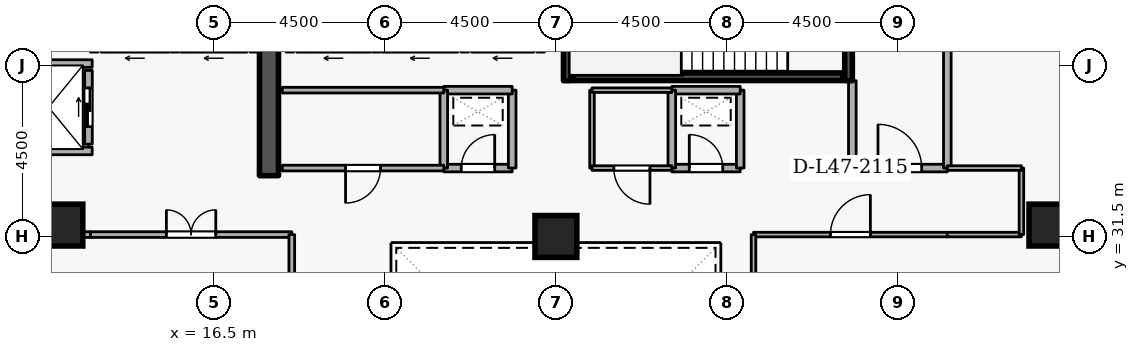
"""IFC4 building model, lengths in metres.
Left out: names, types, materials, properties, quantities, classifications, styles, units other than length and angle.
Written with IfcOpenShell. Run it as: python <this file> out.ifc"""

import sys

from ifc_helpers import new_model, si_unit, direction, frame, frame_2d, origin, origin_2d, place, context, subcontext, project, spatial, rectangle, extrude, element, fill, save


model = new_model("IFC4")
c1 = context("Model", 3, precision=1e-05, world=origin(), true_north=direction((0.0, 1.0)))
c2 = subcontext(c1, "Body", "Model", "MODEL_VIEW")
j1 = project(units=[si_unit("LENGTHUNIT", "METRE"), si_unit("PLANEANGLEUNIT", "RADIAN")], contexts=[c1])
p1 = place(None, origin())
s1 = spatial("IfcSite", under=j1, at=p1, CompositionType="ELEMENT")
p2 = place(p1, origin())
s2 = spatial("IfcBuilding", under=s1, at=p2, CompositionType="ELEMENT")
p3 = place(p2, frame((0.0, 0.0, 178.5)))
s3 = spatial("IfcBuildingStorey", under=s2, at=p3, CompositionType="ELEMENT", Elevation=178.5)
p4 = place(p3, frame((17.95, 33.1, 0.0), z_axis=(0.0, 0.0, 1.0), x_axis=(0.0, 1.0, 0.0)))
e1 = element("IfcWall", 1, at=p4, inside=s3, PredefinedType="SHEAR", context=c2, shape_type="SweptSolid", body=[
    extrude(rectangle(XDim=5.8, YDim=0.5, at=frame_2d((2.9, 0.0))), origin(), (0.0, 0.0, 1.0), 3.6),
])
for number, where, z_axis, x_axis in (
    (2, (12.5, 31.8, 0.0), (0.0, 0.0, 1.0), (1.0, 0.0, 0.0)),
    (3, (38.5, 31.8, 0.0), (0.0, 0.0, 1.0), (1.0, 0.0, 0.0)),
    (4, (25.5, 31.5, 0.0), (0.0, 0.0, 1.0), (1.0, 0.0, 0.0)),
):
    element("IfcColumn", number, at=place(p3, frame(where, z_axis=z_axis, x_axis=x_axis)), inside=s3, PredefinedType="COLUMN", context=c2, shape_type="SweptSolid", body=[
        extrude(rectangle(XDim=1.1, YDim=1.1, at=origin_2d()), origin(), (0.0, 0.0, 1.0), 3.6),
    ])
p5 = place(p3, frame((24.92, 36.45, 0.0), z_axis=(0.0, 0.0, 1.0), x_axis=(-1.0, 0.0, 0.0)))
e5 = element("IfcWall", 5, at=p5, inside=s3, PredefinedType="STANDARD", context=c2, shape_type="SweptSolid", body=[
    extrude(rectangle(XDim=1.64, YDim=0.2, at=frame_2d((0.82, 0.0))), origin(), (0.0, 0.0, 1.0), 3.34),
])
p6 = place(p5, frame((0.31, 0.0, 0.0)))
e6 = element("IfcOpeningElement", 6, at=p6, cuts=e5, PredefinedType="OPENING", context=c2, shape_type="SweptSolid", body=[
    extrude(rectangle(XDim=1.02, YDim=2.06, at=frame_2d((0.51, 1.03))), frame((0.0, 0.11, 0.0), z_axis=(0.0, -1.0, 0.0), x_axis=(1.0, 0.0, 0.0)), (0.0, 0.0, 1.0), 0.22),
])
p7 = place(p3, frame((22.92, 36.45, 0.0), z_axis=(0.0, 0.0, 1.0), x_axis=(-1.0, 0.0, 0.0)))
e7 = element("IfcWall", 7, at=p7, inside=s3, PredefinedType="STANDARD", context=c2, shape_type="SweptSolid", body=[
    extrude(rectangle(XDim=1.99, YDim=0.2, at=frame_2d((0.995, 0.0))), origin(), (0.0, 0.0, 1.0), 3.34),
])
p8 = place(p7, frame((0.485, 0.0, 0.0)))
e8 = element("IfcOpeningElement", 8, at=p8, cuts=e7, PredefinedType="OPENING", context=c2, shape_type="SweptSolid", body=[
    extrude(rectangle(XDim=1.02, YDim=2.06, at=frame_2d((0.51, 1.03))), frame((0.0, 0.11, 0.0), z_axis=(0.0, -1.0, 0.0), x_axis=(1.0, 0.0, 0.0)), (0.0, 0.0, 1.0), 0.22),
])
p9 = place(p3, frame((20.62, 36.45, 0.0), z_axis=(0.0, 0.0, 1.0), x_axis=(-1.0, 0.0, 0.0)))
e9 = element("IfcWall", 9, at=p9, inside=s3, PredefinedType="STANDARD", context=c2, shape_type="SweptSolid", body=[
    extrude(rectangle(XDim=1.94, YDim=0.2, at=frame_2d((0.97, 0.0))), origin(), (0.0, 0.0, 1.0), 3.34),
])
p10 = place(p9, frame((0.46, 0.0, 0.0)))
e10 = element("IfcOpeningElement", 10, at=p10, cuts=e9, PredefinedType="OPENING", context=c2, shape_type="SweptSolid", body=[
    extrude(rectangle(XDim=1.02, YDim=2.06, at=frame_2d((0.51, 1.03))), frame((0.0, 0.11, 0.0), z_axis=(0.0, -1.0, 0.0), x_axis=(1.0, 0.0, 0.0)), (0.0, 0.0, 1.0), 0.22),
])
p11 = place(p3, frame((17.37, 36.45, 0.0), z_axis=(0.0, 0.0, 1.0), x_axis=(-1.0, 0.0, 0.0)))
e11 = element("IfcWall", 11, at=p11, inside=s3, PredefinedType="STANDARD", context=c2, shape_type="SweptSolid", body=[
    extrude(rectangle(XDim=1.74, YDim=0.2, at=frame_2d((0.87, 0.0))), origin(), (0.0, 0.0, 1.0), 3.34),
])
p12 = place(p11, frame((0.36, 0.0, 0.0)))
e12 = element("IfcOpeningElement", 12, at=p12, cuts=e11, PredefinedType="OPENING", context=c2, shape_type="SweptSolid", body=[
    extrude(rectangle(XDim=1.02, YDim=2.06, at=frame_2d((0.51, 1.03))), frame((0.0, 0.11, 0.0), z_axis=(0.0, -1.0, 0.0), x_axis=(1.0, 0.0, 0.0)), (0.0, 0.0, 1.0), 0.22),
])
p13 = place(p3, frame((15.32, 36.45, 0.0), z_axis=(0.0, 0.0, 1.0), x_axis=(-1.0, 0.0, 0.0)))
e13 = element("IfcWall", 13, at=p13, inside=s3, PredefinedType="STANDARD", context=c2, shape_type="SweptSolid", body=[
    extrude(rectangle(XDim=1.79, YDim=0.2, at=frame_2d((0.895, 0.0))), origin(), (0.0, 0.0, 1.0), 3.34),
])
p14 = place(p13, frame((0.385, 0.0, 0.0)))
e14 = element("IfcOpeningElement", 14, at=p14, cuts=e13, PredefinedType="OPENING", context=c2, shape_type="SweptSolid", body=[
    extrude(rectangle(XDim=1.02, YDim=2.06, at=frame_2d((0.51, 1.03))), frame((0.0, 0.11, 0.0), z_axis=(0.0, -1.0, 0.0), x_axis=(1.0, 0.0, 0.0)), (0.0, 0.0, 1.0), 0.22),
])
p15 = place(p3, frame((13.2, 33.93, 0.0), z_axis=(0.0, 0.0, 1.0), x_axis=(0.0, 1.0, 0.0)))
e15 = element("IfcWall", 15, at=p15, inside=s3, PredefinedType="STANDARD", context=c2, shape_type="SweptSolid", body=[
    extrude(rectangle(XDim=1.94, YDim=0.2, at=frame_2d((0.97, 0.0))), origin(), (0.0, 0.0, 1.0), 3.34),
])
p16 = place(p15, frame((0.46, 0.0, 0.0)))
e16 = element("IfcOpeningElement", 16, at=p16, cuts=e15, PredefinedType="OPENING", context=c2, shape_type="SweptSolid", body=[
    extrude(rectangle(XDim=1.02, YDim=2.06, at=frame_2d((0.51, 1.03))), frame((0.0, 0.11, 0.0), z_axis=(0.0, -1.0, 0.0), x_axis=(1.0, 0.0, 0.0)), (0.0, 0.0, 1.0), 0.22),
])
for number, where, z_axis, x_axis in (
    (17, (11.002, 36.05, 0.0), (0.0, 0.0, 1.0), (1.0, 0.0, 0.0)),
    (18, (11.002, 33.75, 0.0), (0.0, 0.0, 1.0), (1.0, 0.0, 0.0)),
):
    element("IfcWall", number, at=place(p3, frame(where, z_axis=z_axis, x_axis=x_axis)), inside=s3, PredefinedType="STANDARD", context=c2, shape_type="SweptSolid", body=[
        extrude(rectangle(XDim=2.296, YDim=0.2, at=frame_2d((1.148, 0.0))), origin(), (0.0, 0.0, 1.0), 3.34),
    ])
p17 = place(p3, frame((33.2, 38.95, 0.0), z_axis=(0.0, 0.0, 1.0), x_axis=(0.0, -1.0, 0.0)))
e19 = element("IfcWall", 19, at=p17, inside=s3, PredefinedType="SHEAR", context=c2, shape_type="SweptSolid", body=[
    extrude(rectangle(XDim=3.35, YDim=0.2, at=frame_2d((1.675, 0.0))), origin(), (0.0, 0.0, 1.0), 3.6),
])
p18 = place(p17, frame((1.125, 0.0, 0.0)))
e20 = element("IfcOpeningElement", 20, at=p18, cuts=e19, PredefinedType="OPENING", context=c2, shape_type="SweptSolid", body=[
    extrude(rectangle(XDim=1.1, YDim=2.1, at=frame_2d((0.55, 1.05))), frame((0.0, 0.11, 0.0), z_axis=(0.0, -1.0, 0.0), x_axis=(1.0, 0.0, 0.0)), (0.0, 0.0, 1.0), 0.22),
])
p19 = place(p3, frame((25.8, 35.6, 0.0), z_axis=(0.0, 0.0, 1.0), x_axis=(0.0, 1.0, 0.0)))
e21 = element("IfcWall", 21, at=p19, inside=s3, PredefinedType="SHEAR", context=c2, shape_type="SweptSolid", body=[
    extrude(rectangle(XDim=3.35, YDim=0.2, at=frame_2d((1.675, 0.0))), origin(), (0.0, 0.0, 1.0), 3.6),
])
p20 = place(p3, frame((25.95, 35.703, 0.0), z_axis=(0.0, 0.0, 1.0), x_axis=(1.0, 0.0, 0.0)))
e22 = element("IfcWall", 22, at=p20, inside=s3, PredefinedType="SHEAR", context=c2, shape_type="SweptSolid", body=[
    extrude(rectangle(XDim=7.1, YDim=0.2, at=frame_2d((3.55, 0.0))), origin(), (0.0, 0.0, 1.0), 3.6),
])
p21 = place(p3, frame((33.3, 33.3, 0.0), z_axis=(0.0, 0.0, 1.0), x_axis=(1.0, 0.0, 0.0)))
e23 = element("IfcWall", 23, at=p21, inside=s3, PredefinedType="STANDARD", context=c2, shape_type="SweptSolid", body=[
    extrude(rectangle(XDim=2.5, YDim=0.2, at=frame_2d((1.25, 0.0))), origin(), (0.0, 0.0, 1.0), 3.34),
])
p22 = place(p21, frame((0.675, 0.0, 0.0)))
e24 = element("IfcOpeningElement", 24, at=p22, cuts=e23, PredefinedType="OPENING", context=c2, shape_type="SweptSolid", body=[
    extrude(rectangle(XDim=1.15, YDim=2.1, at=frame_2d((0.575, 1.05))), frame((0.0, 0.11, 0.0), z_axis=(0.0, -1.0, 0.0), x_axis=(1.0, 0.0, 0.0)), (0.0, 0.0, 1.0), 0.22),
])
p23 = place(p3, frame((35.8, 33.3, 0.0), z_axis=(0.0, 0.0, 1.0), x_axis=(0.0, 1.0, 0.0)))
e25 = element("IfcWall", 25, at=p23, inside=s3, PredefinedType="STANDARD", context=c2, shape_type="SweptSolid", body=[
    extrude(rectangle(XDim=5.7, YDim=0.2, at=frame_2d((2.85, 0.0))), origin(), (0.0, 0.0, 1.0), 3.34),
])
p24 = place(p3, frame((33.3, 35.6, 0.0), z_axis=(0.0, 0.0, 1.0), x_axis=(0.0, -1.0, 0.0)))
e26 = element("IfcWall", 26, at=p24, inside=s3, PredefinedType="STANDARD", context=c2, shape_type="SweptSolid", body=[
    extrude(rectangle(XDim=2.3, YDim=0.2, at=frame_2d((1.15, 0.0))), origin(), (0.0, 0.0, 1.0), 2.545),
])
p25 = place(p3, frame((22.55, 33.3, 0.0), z_axis=(0.0, 0.0, 1.0), x_axis=(1.0, 0.0, 0.0)))
e27 = element("IfcWall", 27, at=p25, inside=s3, PredefinedType="STANDARD", context=c2, shape_type="SweptSolid", body=[
    extrude(rectangle(XDim=1.8, YDim=0.2, at=frame_2d((0.9, 0.0))), origin(), (0.0, 0.0, 1.0), 3.34),
])
p26 = place(p25, frame((0.46, 0.0, 0.0)))
e28 = element("IfcOpeningElement", 28, at=p26, cuts=e27, PredefinedType="OPENING", context=c2, shape_type="SweptSolid", body=[
    extrude(rectangle(XDim=0.88, YDim=2.04, at=frame_2d((0.44, 1.02))), frame((0.0, 0.11, 0.0), z_axis=(0.0, -1.0, 0.0), x_axis=(1.0, 0.0, 0.0)), (0.0, 0.0, 1.0), 0.22),
])
p27 = place(p3, frame((24.35, 33.3, 0.0), z_axis=(0.0, 0.0, 1.0), x_axis=(0.0, 1.0, 0.0)))
e29 = element("IfcWall", 29, at=p27, inside=s3, PredefinedType="STANDARD", context=c2, shape_type="SweptSolid", body=[
    extrude(rectangle(XDim=2.05, YDim=0.2, at=frame_2d((1.025, 0.0))), origin(), (0.0, 0.0, 1.0), 3.34),
])
p28 = place(p3, frame((24.35, 35.35, 0.0), z_axis=(0.0, 0.0, 1.0), x_axis=(-1.0, 0.0, 0.0)))
e30 = element("IfcWall", 30, at=p28, inside=s3, PredefinedType="STANDARD", context=c2, shape_type="SweptSolid", body=[
    extrude(rectangle(XDim=1.8, YDim=0.2, at=frame_2d((0.9, 0.0))), origin(), (0.0, 0.0, 1.0), 3.34),
])
p29 = place(p3, frame((22.55, 35.35, 0.0), z_axis=(0.0, 0.0, 1.0), x_axis=(0.0, -1.0, 0.0)))
e31 = element("IfcWall", 31, at=p29, inside=s3, PredefinedType="STANDARD", context=c2, shape_type="SweptSolid", body=[
    extrude(rectangle(XDim=2.05, YDim=0.2, at=frame_2d((1.025, 0.0))), origin(), (0.0, 0.0, 1.0), 3.34),
])
p30 = place(p3, frame((28.55, 33.3, 0.0), z_axis=(0.0, 0.0, 1.0), x_axis=(1.0, 0.0, 0.0)))
e32 = element("IfcWall", 32, at=p30, inside=s3, PredefinedType="STANDARD", context=c2, shape_type="SweptSolid", body=[
    extrude(rectangle(XDim=1.8, YDim=0.2, at=frame_2d((0.9, 0.0))), origin(), (0.0, 0.0, 1.0), 3.34),
])
p31 = place(p30, frame((0.46, 0.0, 0.0)))
e33 = element("IfcOpeningElement", 33, at=p31, cuts=e32, PredefinedType="OPENING", context=c2, shape_type="SweptSolid", body=[
    extrude(rectangle(XDim=0.88, YDim=2.04, at=frame_2d((0.44, 1.02))), frame((0.0, 0.11, 0.0), z_axis=(0.0, -1.0, 0.0), x_axis=(1.0, 0.0, 0.0)), (0.0, 0.0, 1.0), 0.22),
])
p32 = place(p3, frame((30.35, 33.3, 0.0), z_axis=(0.0, 0.0, 1.0), x_axis=(0.0, 1.0, 0.0)))
e34 = element("IfcWall", 34, at=p32, inside=s3, PredefinedType="STANDARD", context=c2, shape_type="SweptSolid", body=[
    extrude(rectangle(XDim=2.05, YDim=0.2, at=frame_2d((1.025, 0.0))), origin(), (0.0, 0.0, 1.0), 3.34),
])
p33 = place(p3, frame((30.35, 35.35, 0.0), z_axis=(0.0, 0.0, 1.0), x_axis=(-1.0, 0.0, 0.0)))
e35 = element("IfcWall", 35, at=p33, inside=s3, PredefinedType="STANDARD", context=c2, shape_type="SweptSolid", body=[
    extrude(rectangle(XDim=1.8, YDim=0.2, at=frame_2d((0.9, 0.0))), origin(), (0.0, 0.0, 1.0), 3.34),
])
p34 = place(p3, frame((28.55, 35.35, 0.0), z_axis=(0.0, 0.0, 1.0), x_axis=(0.0, -1.0, 0.0)))
e36 = element("IfcWall", 36, at=p34, inside=s3, PredefinedType="STANDARD", context=c2, shape_type="SweptSolid", body=[
    extrude(rectangle(XDim=2.05, YDim=0.2, at=frame_2d((1.025, 0.0))), origin(), (0.0, 0.0, 1.0), 3.34),
])
p35 = place(p3, frame((18.3, 35.35, 0.0), z_axis=(0.0, 0.0, 1.0), x_axis=(1.0, 0.0, 0.0)))
e37 = element("IfcWall", 37, at=p35, inside=s3, PredefinedType="PARTITIONING", context=c2, shape_type="SweptSolid", body=[
    extrude(rectangle(XDim=4.25, YDim=0.15, at=frame_2d((2.125, 0.0))), origin(), (0.0, 0.0, 1.0), 3.34),
])
p36 = place(p3, frame((22.55, 33.3, 0.0), z_axis=(0.0, 0.0, 1.0), x_axis=(-1.0, 0.0, 0.0)))
e38 = element("IfcWall", 38, at=p36, inside=s3, PredefinedType="PARTITIONING", context=c2, shape_type="SweptSolid", body=[
    extrude(rectangle(XDim=4.25, YDim=0.15, at=frame_2d((2.125, 0.0))), origin(), (0.0, 0.0, 1.0), 3.34),
])
p37 = place(p36, frame((1.665, 0.0, 0.0)))
e39 = element("IfcOpeningElement", 39, at=p37, cuts=e38, PredefinedType="OPENING", context=c2, shape_type="SweptSolid", body=[
    extrude(rectangle(XDim=0.92, YDim=2.08, at=frame_2d((0.46, 1.04))), frame((0.0, 0.085, 0.0), z_axis=(0.0, -1.0, 0.0), x_axis=(1.0, 0.0, 0.0)), (0.0, 0.0, 1.0), 0.17),
])
p38 = place(p3, frame((26.45, 33.3, 0.0), z_axis=(0.0, 0.0, 1.0), x_axis=(0.0, 1.0, 0.0)))
e40 = element("IfcWall", 40, at=p38, inside=s3, PredefinedType="PARTITIONING", context=c2, shape_type="SweptSolid", body=[
    extrude(rectangle(XDim=2.05, YDim=0.12, at=frame_2d((1.025, 0.0))), origin(), (0.0, 0.0, 1.0), 3.34),
])
p39 = place(p3, frame((26.45, 35.35, 0.0), z_axis=(0.0, 0.0, 1.0), x_axis=(1.0, 0.0, 0.0)))
e41 = element("IfcWall", 41, at=p39, inside=s3, PredefinedType="PARTITIONING", context=c2, shape_type="SweptSolid", body=[
    extrude(rectangle(XDim=2.1, YDim=0.12, at=frame_2d((1.05, 0.0))), origin(), (0.0, 0.0, 1.0), 3.34),
])
p40 = place(p3, frame((28.55, 33.3, 0.0), z_axis=(0.0, 0.0, 1.0), x_axis=(-1.0, 0.0, 0.0)))
e42 = element("IfcWall", 42, at=p40, inside=s3, PredefinedType="PARTITIONING", context=c2, shape_type="SweptSolid", body=[
    extrude(rectangle(XDim=2.1, YDim=0.12, at=frame_2d((1.05, 0.0))), origin(), (0.0, 0.0, 1.0), 3.34),
])
p41 = place(p40, frame((0.575, 0.0, 0.0)))
e43 = element("IfcOpeningElement", 43, at=p41, cuts=e42, PredefinedType="OPENING", context=c2, shape_type="SweptSolid", body=[
    extrude(rectangle(XDim=0.95, YDim=2.1, at=frame_2d((0.475, 1.05))), frame((0.0, 0.07, 0.0), z_axis=(0.0, -1.0, 0.0), x_axis=(1.0, 0.0, 0.0)), (0.0, 0.0, 1.0), 0.14),
])
p42 = place(p3, frame((13.25, 31.55, 0.0), z_axis=(0.0, 0.0, 1.0), x_axis=(1.0, 0.0, 0.0)))
e44 = element("IfcWall", 44, at=p42, inside=s3, PredefinedType="PARTITIONING", context=c2, shape_type="SweptSolid", body=[
    extrude(rectangle(XDim=5.3, YDim=0.15, at=frame_2d((2.65, 0.0))), origin(), (0.0, 0.0, 1.0), 3.34),
])
p43 = place(p42, frame((2.0, 0.0, 0.0)))
e45 = element("IfcOpeningElement", 45, at=p43, cuts=e44, PredefinedType="OPENING", context=c2, shape_type="SweptSolid", body=[
    extrude(rectangle(XDim=1.3, YDim=2.12, at=frame_2d((0.65, 1.06))), frame((0.0, 0.085, 0.0), z_axis=(0.0, -1.0, 0.0), x_axis=(1.0, 0.0, 0.0)), (0.0, 0.0, 1.0), 0.17),
])
p44 = place(p3, frame((18.55, 31.55, 0.0), z_axis=(0.0, 0.0, 1.0), x_axis=(0.0, -1.0, 0.0)))
e46 = element("IfcWall", 46, at=p44, inside=s3, PredefinedType="PARTITIONING", context=c2, shape_type="SweptSolid", body=[
    extrude(rectangle(XDim=4.55, YDim=0.15, at=frame_2d((2.275, 0.0))), origin(), (0.0, 0.0, 1.0), 3.34),
])
p45 = place(p3, frame((10.9, 31.55, 0.0), z_axis=(0.0, 0.0, 1.0), x_axis=(1.0, 0.0, 0.0)))
e47 = element("IfcWall", 47, at=p45, inside=s3, PredefinedType="PARTITIONING", context=c2, shape_type="SweptSolid", body=[
    extrude(rectangle(XDim=2.35, YDim=0.15, at=frame_2d((1.175, 0.0))), origin(), (0.0, 0.0, 1.0), 3.34),
])
p46 = place(p3, frame((30.7, 31.55, 0.0), z_axis=(0.0, 0.0, 1.0), x_axis=(1.0, 0.0, 0.0)))
e48 = element("IfcWall", 48, at=p46, inside=s3, PredefinedType="PARTITIONING", context=c2, shape_type="SweptSolid", body=[
    extrude(rectangle(XDim=5.1, YDim=0.12, at=frame_2d((2.55, 0.0))), origin(), (0.0, 0.0, 1.0), 3.34),
])
p47 = place(p46, frame((2.025, 0.0, 0.0)))
e49 = element("IfcOpeningElement", 49, at=p47, cuts=e48, PredefinedType="OPENING", context=c2, shape_type="SweptSolid", body=[
    extrude(rectangle(XDim=1.05, YDim=2.1, at=frame_2d((0.525, 1.05))), frame((0.0, 0.07, 0.0), z_axis=(0.0, -1.0, 0.0), x_axis=(1.0, 0.0, 0.0)), (0.0, 0.0, 1.0), 0.14),
])
p48 = place(p3, frame((35.8, 31.55, 0.0), z_axis=(0.0, 0.0, 1.0), x_axis=(1.0, 0.0, 0.0)))
e50 = element("IfcWall", 50, at=p48, inside=s3, PredefinedType="PARTITIONING", context=c2, shape_type="SweptSolid", body=[
    extrude(rectangle(XDim=1.95, YDim=0.12, at=frame_2d((0.975, 0.0))), origin(), (0.0, 0.0, 1.0), 3.34),
])
p49 = place(p3, frame((37.75, 31.55, 0.0), z_axis=(0.0, 0.0, 1.0), x_axis=(0.0, 1.0, 0.0)))
e51 = element("IfcWall", 51, at=p49, inside=s3, PredefinedType="PARTITIONING", context=c2, shape_type="SweptSolid", body=[
    extrude(rectangle(XDim=1.75, YDim=0.12, at=frame_2d((0.875, 0.0))), origin(), (0.0, 0.0, 1.0), 3.34),
])
p50 = place(p3, frame((37.75, 33.3, 0.0), z_axis=(0.0, 0.0, 1.0), x_axis=(-1.0, 0.0, 0.0)))
e52 = element("IfcWall", 52, at=p50, inside=s3, PredefinedType="PARTITIONING", context=c2, shape_type="SweptSolid", body=[
    extrude(rectangle(XDim=1.95, YDim=0.12, at=frame_2d((0.975, 0.0))), origin(), (0.0, 0.0, 1.0), 3.34),
])
p51 = place(p3, frame((30.7, 27.0, 0.0), z_axis=(0.0, 0.0, 1.0), x_axis=(0.0, 1.0, 0.0)))
e53 = element("IfcWall", 53, at=p51, inside=s3, PredefinedType="PARTITIONING", context=c2, shape_type="SweptSolid", body=[
    extrude(rectangle(XDim=4.55, YDim=0.12, at=frame_2d((2.275, 0.0))), origin(), (0.0, 0.0, 1.0), 3.34),
])
p52 = place(p16, origin())
e54 = element("IfcDoor", 54, at=p52, inside=s3, OperationType="SLIDING_TO_LEFT", PredefinedType="DOOR", context=c2, shape_type="SweptSolid", body=[
    extrude(rectangle(XDim=1.02, YDim=2.06, at=frame_2d((0.51, 1.03))), frame((0.0, 0.025, 0.0), z_axis=(0.0, -1.0, 0.0), x_axis=(1.0, 0.0, 0.0)), (0.0, 0.0, 1.0), 0.05),
])
fill(e16, e54)
p53 = place(p22, origin())
e55 = element("IfcDoor", 55, at=p53, inside=s3, OperationType="SINGLE_SWING_LEFT", PredefinedType="DOOR", context=c2, shape_type="SweptSolid", body=[
    extrude(rectangle(XDim=1.15, YDim=2.1, at=frame_2d((0.575, 1.05))), frame((0.0, 0.025, 0.0), z_axis=(0.0, -1.0, 0.0), x_axis=(1.0, 0.0, 0.0)), (0.0, 0.0, 1.0), 0.05),
])
fill(e24, e55)
p54 = place(p26, origin())
e56 = element("IfcDoor", 56, at=p54, inside=s3, OperationType="SINGLE_SWING_RIGHT", PredefinedType="DOOR", context=c2, shape_type="SweptSolid", body=[
    extrude(rectangle(XDim=0.88, YDim=2.04, at=frame_2d((0.44, 1.02))), frame((0.0, 0.025, 0.0), z_axis=(0.0, -1.0, 0.0), x_axis=(1.0, 0.0, 0.0)), (0.0, 0.0, 1.0), 0.05),
])
fill(e28, e56)
p55 = place(p31, origin())
e57 = element("IfcDoor", 57, at=p55, inside=s3, OperationType="SINGLE_SWING_LEFT", PredefinedType="DOOR", context=c2, shape_type="SweptSolid", body=[
    extrude(rectangle(XDim=0.88, YDim=2.04, at=frame_2d((0.44, 1.02))), frame((0.0, 0.025, 0.0), z_axis=(0.0, -1.0, 0.0), x_axis=(1.0, 0.0, 0.0)), (0.0, 0.0, 1.0), 0.05),
])
fill(e33, e57)
p56 = place(p37, origin())
e58 = element("IfcDoor", 58, at=p56, inside=s3, OperationType="SINGLE_SWING_RIGHT", PredefinedType="DOOR", context=c2, shape_type="SweptSolid", body=[
    extrude(rectangle(XDim=0.92, YDim=2.08, at=frame_2d((0.46, 1.04))), frame((0.0, 0.025, 0.0), z_axis=(0.0, -1.0, 0.0), x_axis=(1.0, 0.0, 0.0)), (0.0, 0.0, 1.0), 0.05),
])
fill(e39, e58)
p57 = place(p41, origin())
e59 = element("IfcDoor", 59, at=p57, inside=s3, OperationType="SINGLE_SWING_LEFT", PredefinedType="DOOR", context=c2, shape_type="SweptSolid", body=[
    extrude(rectangle(XDim=0.95, YDim=2.1, at=frame_2d((0.475, 1.05))), frame((0.0, 0.025, 0.0), z_axis=(0.0, -1.0, 0.0), x_axis=(1.0, 0.0, 0.0)), (0.0, 0.0, 1.0), 0.05),
])
fill(e43, e59)
p58 = place(p43, origin())
e60 = element("IfcDoor", 60, at=p58, inside=s3, OperationType="DOUBLE_DOOR_SINGLE_SWING", PredefinedType="DOOR", context=c2, shape_type="SweptSolid", body=[
    extrude(rectangle(XDim=1.3, YDim=2.12, at=frame_2d((0.65, 1.06))), frame((0.0, 0.025, 0.0), z_axis=(0.0, -1.0, 0.0), x_axis=(1.0, 0.0, 0.0)), (0.0, 0.0, 1.0), 0.05),
])
fill(e45, e60)
p59 = place(p47, origin())
e61 = element("IfcDoor", 61, at=p59, inside=s3, OperationType="SINGLE_SWING_RIGHT", PredefinedType="DOOR", context=c2, shape_type="SweptSolid", body=[
    extrude(rectangle(XDim=1.05, YDim=2.1, at=frame_2d((0.525, 1.05))), frame((0.0, 0.025, 0.0), z_axis=(0.0, -1.0, 0.0), x_axis=(1.0, 0.0, 0.0)), (0.0, 0.0, 1.0), 0.05),
])
fill(e49, e61)
save(model, sys.argv[1])
